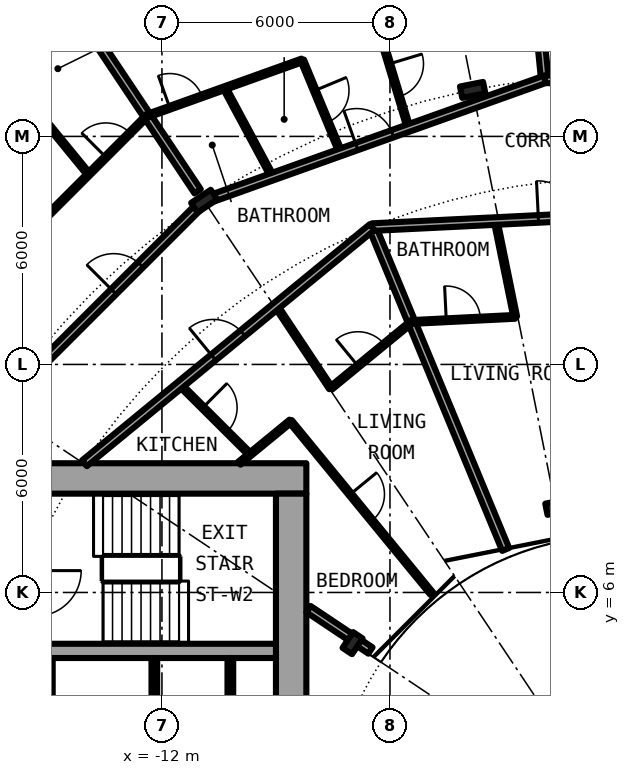
"""IFC4 building model, lengths in metres.
Left out: names, types, materials, properties, quantities, classifications, styles, units other than length and angle.
Written with IfcOpenShell. Run it as: python <this file> out.ifc"""

import sys

from ifc_helpers import new_model, si_unit, direction, frame, frame_2d, origin, origin_2d, place, context, subcontext, project, spatial, rectangle, i_section, extrude, element, fill, save


model = new_model("IFC4")
c1 = context("Model", 3, precision=1e-05, world=origin(), true_north=direction((0.0, 1.0)))
c2 = subcontext(c1, "Body", "Model", "MODEL_VIEW")
j1 = project(units=[si_unit("LENGTHUNIT", "METRE"), si_unit("PLANEANGLEUNIT", "RADIAN")], contexts=[c1])
p1 = place(None, origin())
s1 = spatial("IfcSite", under=j1, at=p1, CompositionType="ELEMENT")
p2 = place(p1, origin())
s2 = spatial("IfcBuilding", under=s1, at=p2, CompositionType="ELEMENT")
p3 = place(p2, frame((0.0, 0.0, 41.1)))
s3 = spatial("IfcBuildingStorey", under=s2, at=p3, CompositionType="ELEMENT", Elevation=41.1)
for number, where, z_axis, x_axis in (
    (1, (-3.824, 19.223, 0.0), (0.0, 0.0, 1.0), (-0.195, 0.981, 0.0)),
    (2, (-10.889, 16.297, 0.0), (0.0, 0.0, 1.0), (-0.556, 0.831, 0.0)),
):
    element("IfcColumn", number, at=place(p3, frame(where, z_axis=z_axis, x_axis=x_axis)), inside=s3, PredefinedType="COLUMN", context=c2, shape_type="SweptSolid", body=[
        extrude(i_section(OverallWidth=0.305, OverallDepth=0.62, WebThickness=0.021, FlangeThickness=0.04, FilletRadius=0.027, at=origin_2d()), origin(), (0.0, 0.0, 1.0), 3.05),
    ])
for number, where, z_axis, x_axis in (
    (3, (-1.639, 8.239, 0.0), (0.0, 0.0, 1.0), (-0.195, 0.981, 0.0)),
    (4, (-6.984, 4.667, 0.0), (0.0, 0.0, 1.0), (-0.831, 0.556, 0.0)),
):
    element("IfcColumn", number, at=place(p3, frame(where, z_axis=z_axis, x_axis=x_axis)), inside=s3, PredefinedType="COLUMN", context=c2, shape_type="SweptSolid", body=[
        extrude(i_section(OverallWidth=0.3, OverallDepth=0.5, WebThickness=0.014, FlangeThickness=0.028, FilletRadius=0.027, at=origin_2d()), origin(), (0.0, 0.0, 1.0), 3.05),
    ])
p4 = place(p3, frame((-8.2, 9.0, 0.0), z_axis=(0.0, 0.0, 1.0), x_axis=(-1.0, 0.0, 0.0)))
e5 = element("IfcWall", 5, at=p4, inside=s3, PredefinedType="SHEAR", context=c2, shape_type="SweptSolid", body=[
    extrude(rectangle(XDim=14.2, YDim=0.8, at=frame_2d((7.1, 0.0))), origin(), (0.0, 0.0, 1.0), 3.05),
])
p5 = place(p4, frame((11.675, 0.0, 0.0)))
e6 = element("IfcOpeningElement", 6, at=p5, cuts=e5, PredefinedType="OPENING", context=c2, shape_type="SweptSolid", body=[
    extrude(rectangle(XDim=1.2, YDim=2.3, at=frame_2d((0.6, 1.15))), frame((0.0, 0.41, 0.0), z_axis=(0.0, -1.0, 0.0), x_axis=(1.0, 0.0, 0.0)), (0.0, 0.0, 1.0), 0.82),
])
p6 = place(p3, frame((-8.6, 8.6, 0.0), z_axis=(0.0, 0.0, 1.0), x_axis=(0.0, -1.0, 0.0)))
e7 = element("IfcWall", 7, at=p6, inside=s3, PredefinedType="SHEAR", context=c2, shape_type="SweptSolid", body=[
    extrude(rectangle(XDim=17.2, YDim=0.8, at=frame_2d((8.6, 0.0))), origin(), (0.0, 0.0, 1.0), 3.05),
])
p7 = place(p6, frame((7.4, 0.0, 0.1)))
e8 = element("IfcOpeningElement", 8, at=p7, cuts=e7, PredefinedType="OPENING", context=c2, shape_type="SweptSolid", body=[
    extrude(rectangle(XDim=2.4, YDim=2.2, at=frame_2d((1.2, 1.1))), frame((0.0, 0.41, 0.0), z_axis=(0.0, -1.0, 0.0), x_axis=(1.0, 0.0, 0.0)), (0.0, 0.0, 1.0), 0.82),
])
p8 = place(p3, frame((-9.0, 4.462, 0.0), z_axis=(0.0, 0.0, 1.0), x_axis=(-1.0, 0.0, 0.0)))
e9 = element("IfcWall", 9, at=p8, inside=s3, PredefinedType="SHEAR", context=c2, shape_type="SweptSolid", body=[
    extrude(rectangle(XDim=10.15, YDim=0.375, at=frame_2d((5.075, 0.0))), origin(), (0.0, 0.0, 1.0), 3.05),
])
p9 = place(p3, frame((-15.0, 1.825, 0.0), z_axis=(0.0, 0.0, 1.0), x_axis=(0.0, 1.0, 0.0)))
e10 = element("IfcWall", 10, at=p9, inside=s3, PredefinedType="SOLIDWALL", context=c2, shape_type="SweptSolid", body=[
    extrude(rectangle(XDim=2.45, YDim=0.25, at=frame_2d((1.225, 0.0))), origin(), (0.0, 0.0, 1.0), 2.7),
])
for number, where, z_axis, x_axis in (
    (11, (-10.2, 1.825, 0.0), (0.0, 0.0, 1.0), (0.0, 1.0, 0.0)),
    (12, (-12.2, 1.825, 0.0), (0.0, 0.0, 1.0), (0.0, 1.0, 0.0)),
):
    element("IfcWall", number, at=place(p3, frame(where, z_axis=z_axis, x_axis=x_axis)), inside=s3, PredefinedType="PARTITIONING", context=c2, shape_type="SweptSolid", body=[
        extrude(rectangle(XDim=2.45, YDim=0.15, at=frame_2d((1.225, 0.0))), origin(), (0.0, 0.0, 1.0), 2.7),
    ])
p10 = place(p3, frame((-17.221, 21.022, 0.0), z_axis=(0.0, 0.0, 1.0), x_axis=(0.633662498939, -0.773609615658, 0.0)))
e13 = element("IfcWall", 13, at=p10, inside=s3, PredefinedType="PARTITIONING", context=c2, shape_type="SweptSolid", body=[
    extrude(rectangle(XDim=5.195, YDim=0.1, at=frame_2d((2.598, 0.0))), origin(), (0.0, 0.0, 1.0), 2.7),
])
p11 = place(p3, frame((-15.097, 22.595, 0.0), z_axis=(0.0, 0.0, 1.0), x_axis=(0.555576285599, -0.831465568067, 0.0)))
e14 = element("IfcWall", 14, at=p11, inside=s3, PredefinedType="PARTITIONING", context=c2, shape_type="SweptSolid", body=[
    extrude(rectangle(XDim=7.264, YDim=0.2, at=frame_2d((3.632, 0.0))), origin(), (0.0, 0.0, 1.0), 2.7),
])
p12 = place(p3, frame((-11.524, 11.464, 0.0), z_axis=(0.0, 0.0, 1.0), x_axis=(0.708796844581, -0.705412668665, 0.0)))
e15 = element("IfcWall", 15, at=p12, inside=s3, PredefinedType="PARTITIONING", context=c2, shape_type="SweptSolid", body=[
    extrude(rectangle(XDim=2.597, YDim=0.1, at=frame_2d((1.299, 0.0))), origin(), (0.0, 0.0, 1.0), 2.7),
])
p13 = place(p12, frame((0.849, 0.0, 0.0)))
e16 = element("IfcOpeningElement", 16, at=p13, cuts=e15, PredefinedType="OPENING", context=c2, shape_type="SweptSolid", body=[
    extrude(rectangle(XDim=0.9, YDim=2.3, at=frame_2d((0.45, 1.15))), frame((0.0, 0.06, 0.0), z_axis=(0.0, -1.0, 0.0), x_axis=(1.0, 0.0, 0.0)), (0.0, 0.0, 1.0), 0.12),
])
p14 = place(p3, frame((-10.349, 19.272, 0.0), z_axis=(0.0, 0.0, 1.0), x_axis=(0.473203488521, -0.880953153381, 0.0)))
e17 = element("IfcWall", 17, at=p14, inside=s3, PredefinedType="PARTITIONING", context=c2, shape_type="SweptSolid", body=[
    extrude(rectangle(XDim=2.648, YDim=0.1, at=frame_2d((1.324, 0.0))), origin(), (0.0, 0.0, 1.0), 2.7),
])
p15 = place(p3, frame((-8.996, 13.539, 0.0), z_axis=(0.0, 0.0, 1.0), x_axis=(0.553615197403, -0.83277260594, 0.0)))
e18 = element("IfcWall", 18, at=p15, inside=s3, PredefinedType="PARTITIONING", context=c2, shape_type="SweptSolid", body=[
    extrude(rectangle(XDim=2.597, YDim=0.1, at=frame_2d((1.299, 0.0))), origin(), (0.0, 0.0, 1.0), 2.7),
])
p16 = place(p3, frame((-8.62, 10.504, 0.0), z_axis=(0.0, 0.0, 1.0), x_axis=(0.634358693064, -0.773038840249, 0.0)))
e19 = element("IfcWall", 19, at=p16, inside=s3, PredefinedType="PARTITIONING", context=c2, shape_type="SweptSolid", body=[
    extrude(rectangle(XDim=5.868, YDim=0.1, at=frame_2d((2.934, 0.0))), origin(), (0.0, 0.0, 1.0), 2.7),
])
p17 = place(p16, frame((2.484, 0.0, 0.0)))
e20 = element("IfcOpeningElement", 20, at=p17, cuts=e19, PredefinedType="OPENING", context=c2, shape_type="SweptSolid", body=[
    extrude(rectangle(XDim=0.9, YDim=2.3, at=frame_2d((0.45, 1.15))), frame((0.0, 0.06, 0.0), z_axis=(0.0, -1.0, 0.0), x_axis=(1.0, 0.0, 0.0)), (0.0, 0.0, 1.0), 0.12),
])
p18 = place(p3, frame((-8.308, 20.002, 0.0), z_axis=(0.0, 0.0, 1.0), x_axis=(0.38363686428, -0.923484031462, 0.0)))
e21 = element("IfcWall", 21, at=p18, inside=s3, PredefinedType="PARTITIONING", context=c2, shape_type="SweptSolid", body=[
    extrude(rectangle(XDim=2.623, YDim=0.1, at=frame_2d((1.311, 0.0))), origin(), (0.0, 0.0, 1.0), 2.7),
])
p19 = place(p18, frame((0.861, 0.0, 0.0)))
e22 = element("IfcOpeningElement", 22, at=p19, cuts=e21, PredefinedType="OPENING", context=c2, shape_type="SweptSolid", body=[
    extrude(rectangle(XDim=0.9, YDim=2.3, at=frame_2d((0.45, 1.15))), frame((0.0, 0.06, 0.0), z_axis=(0.0, -1.0, 0.0), x_axis=(1.0, 0.0, 0.0)), (0.0, 0.0, 1.0), 0.12),
])
p20 = place(p3, frame((-7.863, 26.012, 0.0), z_axis=(0.0, 0.0, 1.0), x_axis=(0.289372881225, -0.957216451808, 0.0)))
e23 = element("IfcWall", 23, at=p20, inside=s3, PredefinedType="PARTITIONING", context=c2, shape_type="SweptSolid", body=[
    extrude(rectangle(XDim=8.138, YDim=0.1, at=frame_2d((4.069, 0.0))), origin(), (0.0, 0.0, 1.0), 2.7),
])
p21 = place(p20, frame((6.377, 0.0, 0.0)))
e24 = element("IfcOpeningElement", 24, at=p21, cuts=e23, PredefinedType="OPENING", context=c2, shape_type="SweptSolid", body=[
    extrude(rectangle(XDim=0.9, YDim=2.3, at=frame_2d((0.45, 1.15))), frame((0.0, 0.06, 0.0), z_axis=(0.0, -1.0, 0.0), x_axis=(1.0, 0.0, 0.0)), (0.0, 0.0, 1.0), 0.12),
])
p22 = place(p20, frame((2.308, 0.0, 0.0)))
e25 = element("IfcOpeningElement", 25, at=p22, cuts=e23, PredefinedType="OPENING", context=c2, shape_type="SweptSolid", body=[
    extrude(rectangle(XDim=0.9, YDim=2.3, at=frame_2d((0.45, 1.15))), frame((0.0, 0.06, 0.0), z_axis=(0.0, -1.0, 0.0), x_axis=(1.0, 0.0, 0.0)), (0.0, 0.0, 1.0), 0.12),
])
p23 = place(p3, frame((-6.467, 15.614, 0.0), z_axis=(0.0, 0.0, 1.0), x_axis=(0.382556139466, -0.923932248683, 0.0)))
e26 = element("IfcWall", 26, at=p23, inside=s3, PredefinedType="PARTITIONING", context=c2, shape_type="SweptSolid", body=[
    extrude(rectangle(XDim=9.18, YDim=0.2, at=frame_2d((4.59, 0.0))), origin(), (0.0, 0.0, 1.0), 2.7),
])
p24 = place(p3, frame((-3.218, 15.773, 0.0), z_axis=(0.0, 0.0, 1.0), x_axis=(0.199820523641, -0.979832515449, 0.0)))
e27 = element("IfcWall", 27, at=p24, inside=s3, PredefinedType="PARTITIONING", context=c2, shape_type="SweptSolid", body=[
    extrude(rectangle(XDim=2.572, YDim=0.1, at=frame_2d((1.286, 0.0))), origin(), (0.0, 0.0, 1.0), 2.7),
])
p25 = place(p3, frame((-2.67, 27.043, 0.0), z_axis=(0.0, 0.0, 1.0), x_axis=(0.098208010272, -0.995165909142, 0.0)))
e28 = element("IfcWall", 28, at=p25, inside=s3, PredefinedType="PARTITIONING", context=c2, shape_type="SweptSolid", body=[
    extrude(rectangle(XDim=7.575, YDim=0.2, at=frame_2d((3.787, 0.0))), origin(), (0.0, 0.0, 1.0), 2.7),
])
p26 = place(p3, frame((-6.513, 4.472, 0.0), z_axis=(0.0, 0.0, 1.0), x_axis=(-0.831417956244, 0.555647533996, 0.0)))
e29 = element("IfcWall", 29, at=p26, inside=s3, PredefinedType="PARTITIONING", context=c2, shape_type="SweptSolid", body=[
    extrude(rectangle(XDim=1.962, YDim=0.2, at=frame_2d((0.981, 0.0))), origin(), (0.0, 0.0, 1.0), 2.7),
])
p27 = place(p3, frame((-5.437, 13.117, 0.0), z_axis=(0.0, 0.0, 1.0), x_axis=(0.998779365748, 0.049394114582, 0.0)))
e30 = element("IfcWall", 30, at=p27, inside=s3, PredefinedType="PARTITIONING", context=c2, shape_type="SweptSolid", body=[
    extrude(rectangle(XDim=2.733, YDim=0.1, at=frame_2d((1.367, 0.0))), origin(), (0.0, 0.0, 1.0), 2.7),
])
p28 = place(p27, frame((0.92, 0.0, 0.0)))
e31 = element("IfcOpeningElement", 31, at=p28, cuts=e30, PredefinedType="OPENING", context=c2, shape_type="SweptSolid", body=[
    extrude(rectangle(XDim=0.9, YDim=2.3, at=frame_2d((0.45, 1.15))), frame((0.0, 0.06, 0.0), z_axis=(0.0, -1.0, 0.0), x_axis=(1.0, 0.0, 0.0)), (0.0, 0.0, 1.0), 0.12),
])
p29 = place(p3, frame((-9.965, 9.4, 0.0), z_axis=(0.0, 0.0, 1.0), x_axis=(0.773141825369, 0.634233173104, 0.0)))
e32 = element("IfcWall", 32, at=p29, inside=s3, PredefinedType="PARTITIONING", context=c2, shape_type="SweptSolid", body=[
    extrude(rectangle(XDim=1.749, YDim=0.1, at=frame_2d((0.875, 0.0))), origin(), (0.0, 0.0, 1.0), 2.7),
])
p30 = place(p3, frame((-7.552, 11.379, 0.0), z_axis=(0.0, 0.0, 1.0), x_axis=(0.773323547924, 0.634011585246, 0.0)))
e33 = element("IfcWall", 33, at=p30, inside=s3, PredefinedType="PARTITIONING", context=c2, shape_type="SweptSolid", body=[
    extrude(rectangle(XDim=2.748, YDim=0.1, at=frame_2d((1.374, 0.0))), origin(), (0.0, 0.0, 1.0), 2.7),
])
p31 = place(p30, frame((0.917, 0.0, 0.0)))
e34 = element("IfcOpeningElement", 34, at=p31, cuts=e33, PredefinedType="OPENING", context=c2, shape_type="SweptSolid", body=[
    extrude(rectangle(XDim=0.9, YDim=2.3, at=frame_2d((0.45, 1.15))), frame((0.0, 0.06, 0.0), z_axis=(0.0, -1.0, 0.0), x_axis=(1.0, 0.0, 0.0)), (0.0, 0.0, 1.0), 0.12),
])
p32 = place(p3, frame((-6.472, 15.613, 0.0), z_axis=(0.0, 0.0, 1.0), x_axis=(0.998789903976, 0.049180562371, 0.0)))
e35 = element("IfcWall", 35, at=p32, inside=s3, PredefinedType="PARTITIONING", context=c2, shape_type="SweptSolid", body=[
    extrude(rectangle(XDim=11.388, YDim=0.2, at=frame_2d((5.694, 0.0))), origin(), (0.0, 0.0, 1.0), 2.7),
])
p33 = place(p32, frame((4.383, 0.0, 0.0)))
e36 = element("IfcOpeningElement", 36, at=p33, cuts=e35, PredefinedType="OPENING", context=c2, shape_type="SweptSolid", body=[
    extrude(rectangle(XDim=1.0, YDim=2.3, at=frame_2d((0.5, 1.15))), frame((0.0, 0.11, 0.0), z_axis=(0.0, -1.0, 0.0), x_axis=(1.0, 0.0, 0.0)), (0.0, 0.0, 1.0), 0.22),
])
p34 = place(p3, frame((-14.039, 9.4, 0.0), z_axis=(0.0, 0.0, 1.0), x_axis=(0.77298340166, 0.634426245326, 0.0)))
e37 = element("IfcWall", 37, at=p34, inside=s3, PredefinedType="PARTITIONING", context=c2, shape_type="SweptSolid", body=[
    extrude(rectangle(XDim=9.793, YDim=0.2, at=frame_2d((4.896, 0.0))), origin(), (0.0, 0.0, 1.0), 2.7),
])
p35 = place(p34, frame((4.389, 0.0, 0.0)))
e38 = element("IfcOpeningElement", 38, at=p35, cuts=e37, PredefinedType="OPENING", context=c2, shape_type="SweptSolid", body=[
    extrude(rectangle(XDim=1.0, YDim=2.3, at=frame_2d((0.5, 1.15))), frame((0.0, 0.11, 0.0), z_axis=(0.0, -1.0, 0.0), x_axis=(1.0, 0.0, 0.0)), (0.0, 0.0, 1.0), 0.22),
])
p36 = place(p3, frame((-10.742, 16.351, 0.0), z_axis=(0.0, 0.0, 1.0), x_axis=(0.941707755593, 0.336432018476, 0.0)))
e39 = element("IfcWall", 39, at=p36, inside=s3, PredefinedType="PARTITIONING", context=c2, shape_type="SweptSolid", body=[
    extrude(rectangle(XDim=9.381, YDim=0.2, at=frame_2d((4.69, 0.0))), origin(), (0.0, 0.0, 1.0), 2.38),
])
p37 = place(p36, frame((4.106, 0.0, 0.0)))
e40 = element("IfcOpeningElement", 40, at=p37, cuts=e39, PredefinedType="OPENING", context=c2, shape_type="SweptSolid", body=[
    extrude(rectangle(XDim=1.0, YDim=2.3, at=frame_2d((0.5, 1.15))), frame((0.0, 0.11, 0.0), z_axis=(0.0, -1.0, 0.0), x_axis=(1.0, 0.0, 0.0)), (0.0, 0.0, 1.0), 0.22),
])
p38 = place(p3, frame((-16.187, 10.999, 0.0), z_axis=(0.0, 0.0, 1.0), x_axis=(0.707106781187, 0.707106781187, 0.0)))
e41 = element("IfcWall", 41, at=p38, inside=s3, PredefinedType="PARTITIONING", context=c2, shape_type="SweptSolid", body=[
    extrude(rectangle(XDim=7.337, YDim=0.2, at=frame_2d((3.668, 0.0))), origin(), (0.0, 0.0, 1.0), 2.38),
])
p39 = place(p38, frame((4.124, 0.0, 0.0)))
e42 = element("IfcOpeningElement", 42, at=p39, cuts=e41, PredefinedType="OPENING", context=c2, shape_type="SweptSolid", body=[
    extrude(rectangle(XDim=1.0, YDim=2.3, at=frame_2d((0.5, 1.15))), frame((0.0, 0.11, 0.0), z_axis=(0.0, -1.0, 0.0), x_axis=(1.0, 0.0, 0.0)), (0.0, 0.0, 1.0), 0.22),
])
p40 = place(p3, frame((-1.921, 19.506, 0.0), z_axis=(0.0, 0.0, 1.0), x_axis=(0.99879118777, -0.049154483346, 0.0)))
e43 = element("IfcWall", 43, at=p40, inside=s3, PredefinedType="PARTITIONING", context=c2, shape_type="SweptSolid", body=[
    extrude(rectangle(XDim=5.598, YDim=0.2, at=frame_2d((2.799, 0.0))), origin(), (0.0, 0.0, 1.0), 2.38),
])
p41 = place(p40, frame((3.334, 0.0, 0.0)))
e44 = element("IfcOpeningElement", 44, at=p41, cuts=e43, PredefinedType="OPENING", context=c2, shape_type="SweptSolid", body=[
    extrude(rectangle(XDim=1.0, YDim=2.3, at=frame_2d((0.5, 1.15))), frame((0.0, 0.11, 0.0), z_axis=(0.0, -1.0, 0.0), x_axis=(1.0, 0.0, 0.0)), (0.0, 0.0, 1.0), 0.22),
])
p42 = place(p3, frame((-12.393, 18.539, 0.0), z_axis=(0.0, 0.0, 1.0), x_axis=(0.941491894739, 0.337035624439, 0.0)))
e45 = element("IfcWall", 45, at=p42, inside=s3, PredefinedType="PARTITIONING", context=c2, shape_type="SweptSolid", body=[
    extrude(rectangle(XDim=4.335, YDim=0.1, at=frame_2d((2.167, 0.0))), origin(), (0.0, 0.0, 1.0), 2.7),
])
p43 = place(p42, frame((0.637, 0.0, 0.0)))
e46 = element("IfcOpeningElement", 46, at=p43, cuts=e45, PredefinedType="OPENING", context=c2, shape_type="SweptSolid", body=[
    extrude(rectangle(XDim=0.9, YDim=2.3, at=frame_2d((0.45, 1.15))), frame((0.0, 0.06, 0.0), z_axis=(0.0, -1.0, 0.0), x_axis=(1.0, 0.0, 0.0)), (0.0, 0.0, 1.0), 0.12),
])
p44 = place(p3, frame((-15.465, 15.465, 0.0), z_axis=(0.0, 0.0, 1.0), x_axis=(0.707022606819, 0.707190945535, 0.0)))
e47 = element("IfcWall", 47, at=p44, inside=s3, PredefinedType="PARTITIONING", context=c2, shape_type="SweptSolid", body=[
    extrude(rectangle(XDim=4.351, YDim=0.1, at=frame_2d((2.175, 0.0))), origin(), (0.0, 0.0, 1.0), 2.7),
])
p45 = place(p44, frame((2.813, 0.0, 0.0)))
e48 = element("IfcOpeningElement", 48, at=p45, cuts=e47, PredefinedType="OPENING", context=c2, shape_type="SweptSolid", body=[
    extrude(rectangle(XDim=0.9, YDim=2.3, at=frame_2d((0.45, 1.15))), frame((0.0, 0.06, 0.0), z_axis=(0.0, -1.0, 0.0), x_axis=(1.0, 0.0, 0.0)), (0.0, 0.0, 1.0), 0.12),
])
p46 = place(p37, origin())
e49 = element("IfcDoor", 49, at=p46, inside=s3, OperationType="SINGLE_SWING_LEFT", PredefinedType="DOOR", context=c2, shape_type="SweptSolid", body=[
    extrude(rectangle(XDim=1.0, YDim=2.3, at=frame_2d((0.5, 1.15))), frame((0.0, 0.025, 0.0), z_axis=(0.0, -1.0, 0.0), x_axis=(1.0, 0.0, 0.0)), (0.0, 0.0, 1.0), 0.05),
])
fill(e40, e49)
p47 = place(p43, origin())
e50 = element("IfcDoor", 50, at=p47, inside=s3, OperationType="SINGLE_SWING_LEFT", PredefinedType="DOOR", context=c2, shape_type="SweptSolid", body=[
    extrude(rectangle(XDim=0.9, YDim=2.3, at=frame_2d((0.45, 1.15))), frame((0.0, 0.025, 0.0), z_axis=(0.0, -1.0, 0.0), x_axis=(1.0, 0.0, 0.0)), (0.0, 0.0, 1.0), 0.05),
])
fill(e46, e50)
p48 = place(p19, origin())
e51 = element("IfcDoor", 51, at=p48, inside=s3, OperationType="SINGLE_SWING_RIGHT", PredefinedType="DOOR", context=c2, shape_type="SweptSolid", body=[
    extrude(rectangle(XDim=0.9, YDim=2.3, at=frame_2d((0.45, 1.15))), frame((0.0, 0.025, 0.0), z_axis=(0.0, -1.0, 0.0), x_axis=(1.0, 0.0, 0.0)), (0.0, 0.0, 1.0), 0.05),
])
fill(e22, e51)
p49 = place(p21, origin())
e52 = element("IfcDoor", 52, at=p49, inside=s3, OperationType="SINGLE_SWING_RIGHT", PredefinedType="DOOR", context=c2, shape_type="SweptSolid", body=[
    extrude(rectangle(XDim=0.9, YDim=2.3, at=frame_2d((0.45, 1.15))), frame((0.0, 0.025, 0.0), z_axis=(0.0, -1.0, 0.0), x_axis=(1.0, 0.0, 0.0)), (0.0, 0.0, 1.0), 0.05),
])
fill(e24, e52)
p50 = place(p39, origin())
e53 = element("IfcDoor", 53, at=p50, inside=s3, OperationType="SINGLE_SWING_RIGHT", PredefinedType="DOOR", context=c2, shape_type="SweptSolid", body=[
    extrude(rectangle(XDim=1.0, YDim=2.3, at=frame_2d((0.5, 1.15))), frame((0.0, 0.025, 0.0), z_axis=(0.0, -1.0, 0.0), x_axis=(1.0, 0.0, 0.0)), (0.0, 0.0, 1.0), 0.05),
])
fill(e42, e53)
p51 = place(p45, origin())
e54 = element("IfcDoor", 54, at=p51, inside=s3, OperationType="SINGLE_SWING_RIGHT", PredefinedType="DOOR", context=c2, shape_type="SweptSolid", body=[
    extrude(rectangle(XDim=0.9, YDim=2.3, at=frame_2d((0.45, 1.15))), frame((0.0, 0.025, 0.0), z_axis=(0.0, -1.0, 0.0), x_axis=(1.0, 0.0, 0.0)), (0.0, 0.0, 1.0), 0.05),
])
fill(e48, e54)
p52 = place(p33, origin())
e55 = element("IfcDoor", 55, at=p52, inside=s3, OperationType="SINGLE_SWING_LEFT", PredefinedType="DOOR", context=c2, shape_type="SweptSolid", body=[
    extrude(rectangle(XDim=1.0, YDim=2.3, at=frame_2d((0.5, 1.15))), frame((0.0, 0.025, 0.0), z_axis=(0.0, -1.0, 0.0), x_axis=(1.0, 0.0, 0.0)), (0.0, 0.0, 1.0), 0.05),
])
fill(e36, e55)
p53 = place(p28, origin())
e56 = element("IfcDoor", 56, at=p53, inside=s3, OperationType="SINGLE_SWING_RIGHT", PredefinedType="DOOR", context=c2, shape_type="SweptSolid", body=[
    extrude(rectangle(XDim=0.9, YDim=2.3, at=frame_2d((0.45, 1.15))), frame((0.0, 0.025, 0.0), z_axis=(0.0, -1.0, 0.0), x_axis=(1.0, 0.0, 0.0)), (0.0, 0.0, 1.0), 0.05),
])
fill(e31, e56)
p54 = place(p35, origin())
e57 = element("IfcDoor", 57, at=p54, inside=s3, OperationType="SINGLE_SWING_LEFT", PredefinedType="DOOR", context=c2, shape_type="SweptSolid", body=[
    extrude(rectangle(XDim=1.0, YDim=2.3, at=frame_2d((0.5, 1.15))), frame((0.0, 0.025, 0.0), z_axis=(0.0, -1.0, 0.0), x_axis=(1.0, 0.0, 0.0)), (0.0, 0.0, 1.0), 0.05),
])
fill(e38, e57)
p55 = place(p31, origin())
e58 = element("IfcDoor", 58, at=p55, inside=s3, OperationType="SINGLE_SWING_LEFT", PredefinedType="DOOR", context=c2, shape_type="SweptSolid", body=[
    extrude(rectangle(XDim=0.9, YDim=2.3, at=frame_2d((0.45, 1.15))), frame((0.0, 0.025, 0.0), z_axis=(0.0, -1.0, 0.0), x_axis=(1.0, 0.0, 0.0)), (0.0, 0.0, 1.0), 0.05),
])
fill(e34, e58)
p56 = place(p13, origin())
e59 = element("IfcDoor", 59, at=p56, inside=s3, OperationType="SINGLE_SWING_RIGHT", PredefinedType="DOOR", context=c2, shape_type="SweptSolid", body=[
    extrude(rectangle(XDim=0.9, YDim=2.3, at=frame_2d((0.45, 1.15))), frame((0.0, 0.025, 0.0), z_axis=(0.0, -1.0, 0.0), x_axis=(1.0, 0.0, 0.0)), (0.0, 0.0, 1.0), 0.05),
])
fill(e16, e59)
p57 = place(p17, origin())
e60 = element("IfcDoor", 60, at=p57, inside=s3, OperationType="SINGLE_SWING_RIGHT", PredefinedType="DOOR", context=c2, shape_type="SweptSolid", body=[
    extrude(rectangle(XDim=0.9, YDim=2.3, at=frame_2d((0.45, 1.15))), frame((0.0, 0.025, 0.0), z_axis=(0.0, -1.0, 0.0), x_axis=(1.0, 0.0, 0.0)), (0.0, 0.0, 1.0), 0.05),
])
fill(e20, e60)
save(model, sys.argv[1])
